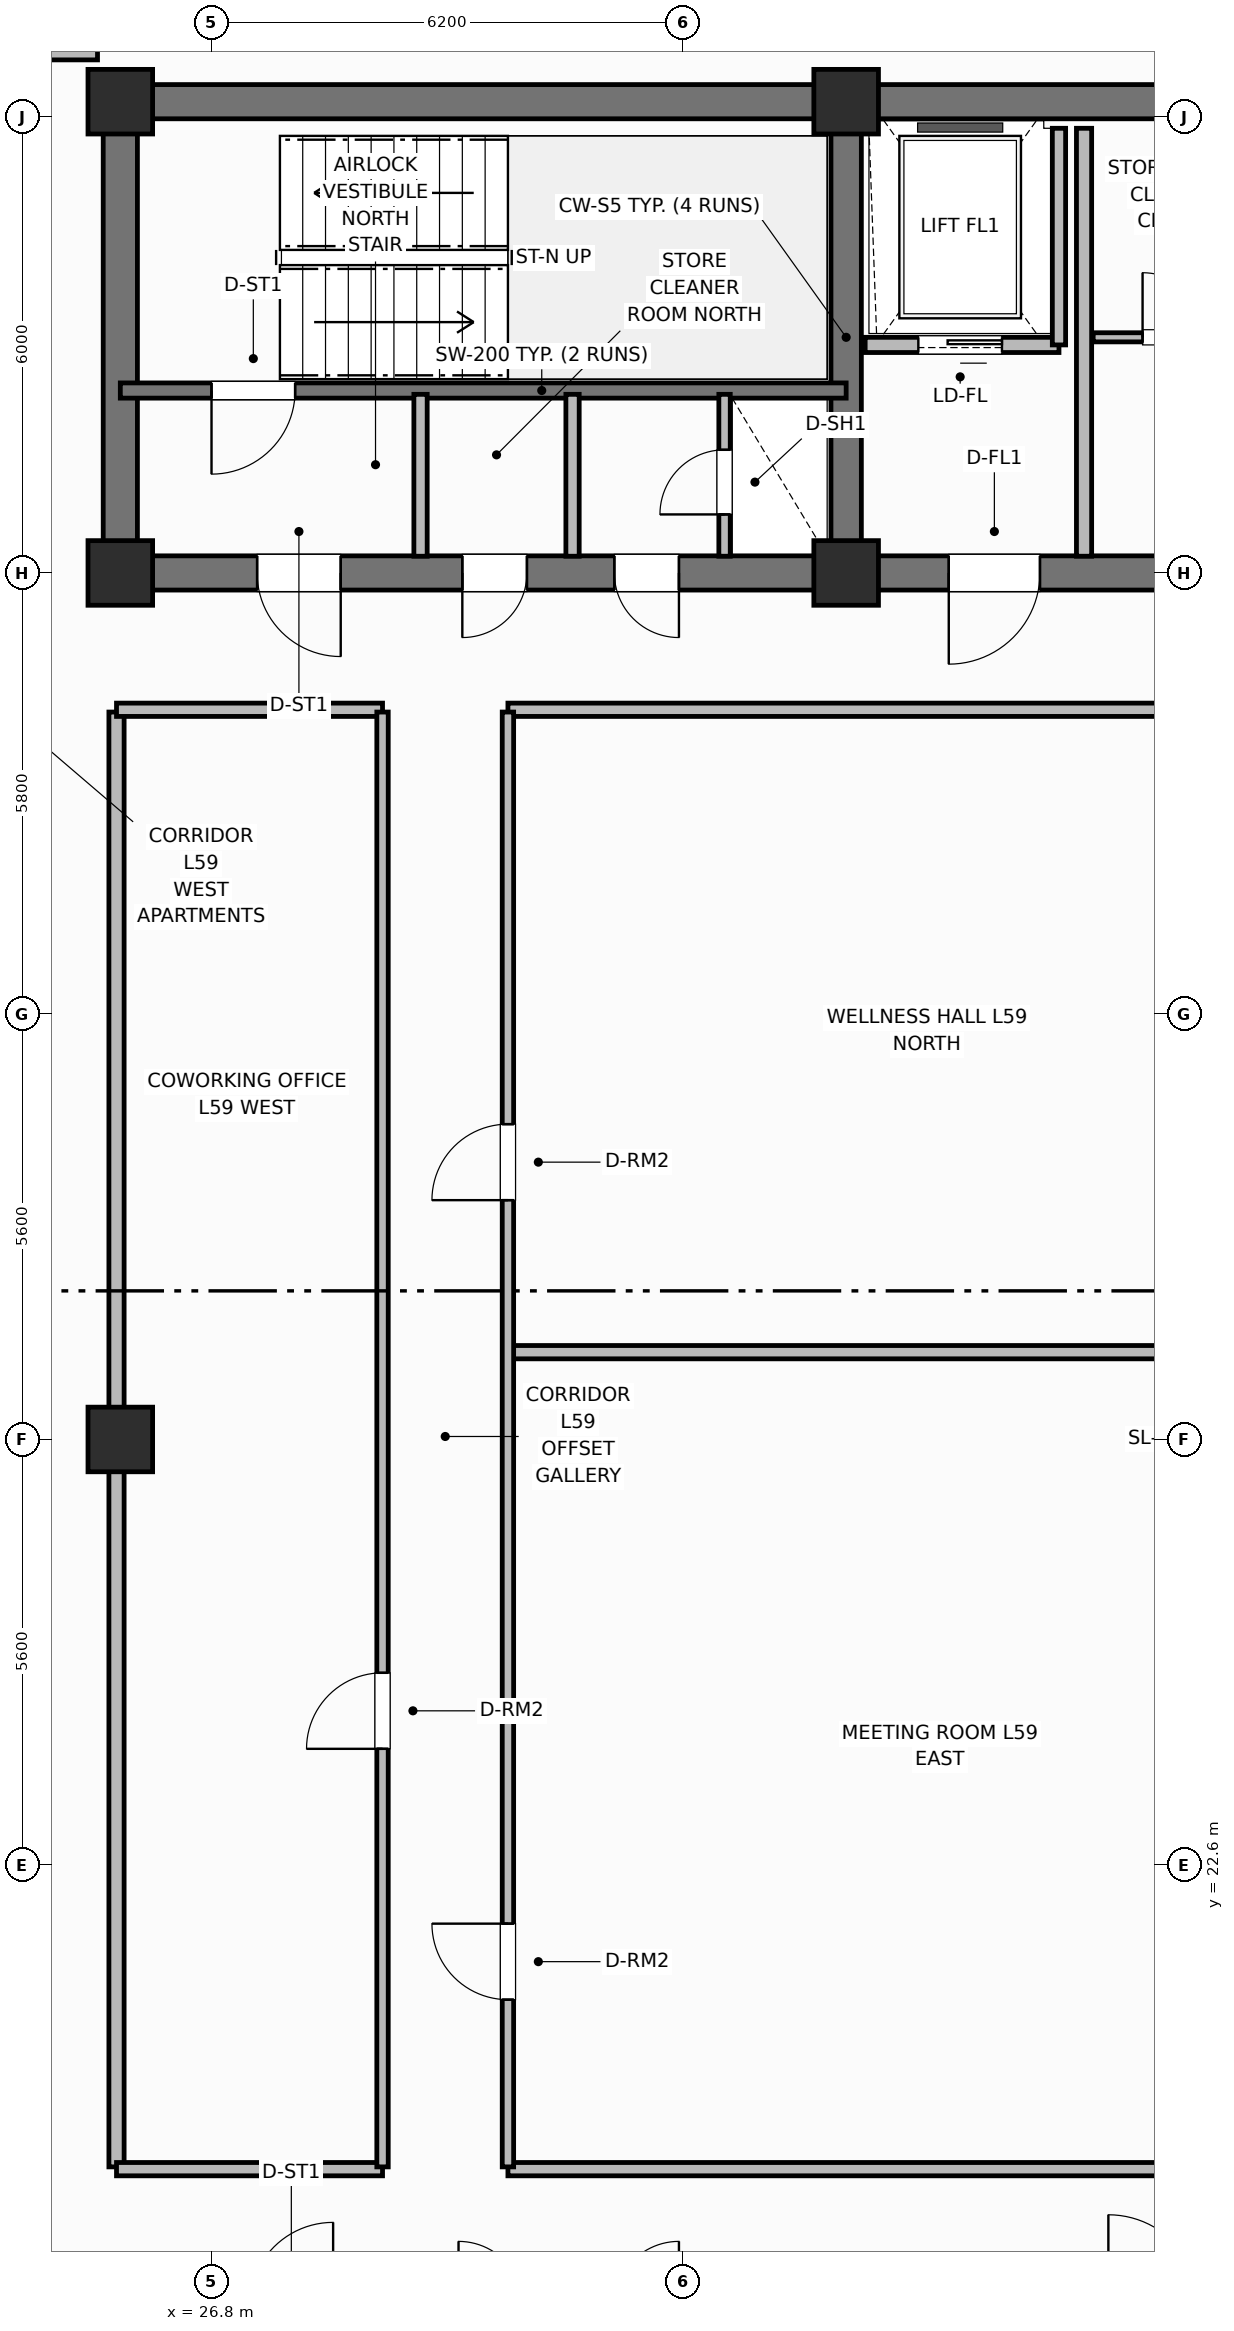
"""IFC4 building model, lengths in metres.
Left out: names, types, materials, properties, quantities, classifications, styles, units other than length and angle.
Written with IfcOpenShell. Run it as: python <this file> out.ifc"""

import sys

from ifc_helpers import new_model, si_unit, direction, frame, frame_2d, origin, origin_2d, place, context, subcontext, project, spatial, rectangle, extrude, element, fill, save


model = new_model("IFC4")
c1 = context("Model", 3, precision=1e-05, world=origin(), true_north=direction((0.0, 1.0)))
c2 = subcontext(c1, "Body", "Model", "MODEL_VIEW")
j1 = project(units=[si_unit("LENGTHUNIT", "METRE"), si_unit("PLANEANGLEUNIT", "RADIAN")], contexts=[c1])
p1 = place(None, origin())
s1 = spatial("IfcSite", under=j1, at=p1, CompositionType="ELEMENT")
p2 = place(p1, origin())
s2 = spatial("IfcBuilding", under=s1, at=p2, CompositionType="ELEMENT")
p3 = place(p2, frame((0.0, 0.0, 236.9)))
s3 = spatial("IfcBuildingStorey", under=s2, at=p3, CompositionType="ELEMENT", Elevation=236.9)
p4 = place(p3, frame((25.6, 45.8, 0.0), z_axis=(0.0, 0.0, 1.0), x_axis=(1.0, 0.0, 0.0)))
e1 = element("IfcWall", 1, at=p4, inside=s3, PredefinedType="SHEAR", context=c2, shape_type="SweptSolid", body=[
    extrude(rectangle(XDim=27.2, YDim=0.45, at=frame_2d((13.6, 0.0))), origin(), (0.0, 0.0, 1.0), 3.7),
])
p5 = place(p3, frame((25.6, 39.825, 0.0), z_axis=(0.0, 0.0, 1.0), x_axis=(0.0, 1.0, 0.0)))
e2 = element("IfcWall", 2, at=p5, inside=s3, PredefinedType="SHEAR", context=c2, shape_type="SweptSolid", body=[
    extrude(rectangle(XDim=5.75, YDim=0.45, at=frame_2d((2.875, 0.0))), origin(), (0.0, 0.0, 1.0), 3.7),
])
p6 = place(p3, frame((52.8, 39.6, 0.0), z_axis=(0.0, 0.0, 1.0), x_axis=(-1.0, 0.0, 0.0)))
e3 = element("IfcWall", 3, at=p6, inside=s3, PredefinedType="SHEAR", context=c2, shape_type="SweptSolid", body=[
    extrude(rectangle(XDim=27.2, YDim=0.45, at=frame_2d((13.6, 0.0))), origin(), (0.0, 0.0, 1.0), 3.7),
])
p7 = place(p6, frame((24.3, 0.0, 0.0)))
e4 = element("IfcOpeningElement", 4, at=p7, cuts=e3, PredefinedType="OPENING", context=c2, shape_type="SweptSolid", body=[
    extrude(rectangle(XDim=1.1, YDim=2.15, at=frame_2d((0.55, 1.075))), frame((0.0, 0.235, 0.0), z_axis=(0.0, -1.0, 0.0), x_axis=(1.0, 0.0, 0.0)), (0.0, 0.0, 1.0), 0.47),
])
p8 = place(p6, frame((21.85, 0.0, 0.0)))
e5 = element("IfcOpeningElement", 5, at=p8, cuts=e3, PredefinedType="OPENING", context=c2, shape_type="SweptSolid", body=[
    extrude(rectangle(XDim=0.85, YDim=2.1, at=frame_2d((0.425, 1.05))), frame((0.0, 0.235, 0.0), z_axis=(0.0, -1.0, 0.0), x_axis=(1.0, 0.0, 0.0)), (0.0, 0.0, 1.0), 0.47),
])
p9 = place(p6, frame((19.85, 0.0, 0.0)))
e6 = element("IfcOpeningElement", 6, at=p9, cuts=e3, PredefinedType="OPENING", context=c2, shape_type="SweptSolid", body=[
    extrude(rectangle(XDim=0.85, YDim=2.1, at=frame_2d((0.425, 1.05))), frame((0.0, 0.235, 0.0), z_axis=(0.0, -1.0, 0.0), x_axis=(1.0, 0.0, 0.0)), (0.0, 0.0, 1.0), 0.47),
])
p10 = place(p6, frame((15.1, 0.0, 0.0)))
e7 = element("IfcOpeningElement", 7, at=p10, cuts=e3, PredefinedType="OPENING", context=c2, shape_type="SweptSolid", body=[
    extrude(rectangle(XDim=1.2, YDim=2.15, at=frame_2d((0.6, 1.075))), frame((0.0, 0.235, 0.0), z_axis=(0.0, -1.0, 0.0), x_axis=(1.0, 0.0, 0.0)), (0.0, 0.0, 1.0), 0.47),
])
p11 = place(p6, frame((12.6, 0.0, 0.0)))
e8 = element("IfcOpeningElement", 8, at=p11, cuts=e3, PredefinedType="OPENING", context=c2, shape_type="SweptSolid", body=[
    extrude(rectangle(XDim=0.85, YDim=2.1, at=frame_2d((0.425, 1.05))), frame((0.0, 0.235, 0.0), z_axis=(0.0, -1.0, 0.0), x_axis=(1.0, 0.0, 0.0)), (0.0, 0.0, 1.0), 0.47),
])
p12 = place(p6, frame((10.85, 0.0, 0.0)))
e9 = element("IfcOpeningElement", 9, at=p12, cuts=e3, PredefinedType="OPENING", context=c2, shape_type="SweptSolid", body=[
    extrude(rectangle(XDim=0.85, YDim=2.1, at=frame_2d((0.425, 1.05))), frame((0.0, 0.235, 0.0), z_axis=(0.0, -1.0, 0.0), x_axis=(1.0, 0.0, 0.0)), (0.0, 0.0, 1.0), 0.47),
])
p13 = place(p6, frame((7.35, 0.0, 0.0)))
e10 = element("IfcOpeningElement", 10, at=p13, cuts=e3, PredefinedType="OPENING", context=c2, shape_type="SweptSolid", body=[
    extrude(rectangle(XDim=0.85, YDim=2.1, at=frame_2d((0.425, 1.05))), frame((0.0, 0.235, 0.0), z_axis=(0.0, -1.0, 0.0), x_axis=(1.0, 0.0, 0.0)), (0.0, 0.0, 1.0), 0.47),
])
p14 = place(p6, frame((4.2, 0.0, 0.0)))
e11 = element("IfcOpeningElement", 11, at=p14, cuts=e3, PredefinedType="OPENING", context=c2, shape_type="SweptSolid", body=[
    extrude(rectangle(XDim=1.3, YDim=2.2, at=frame_2d((0.65, 1.1))), frame((0.0, 0.235, 0.0), z_axis=(0.0, -1.0, 0.0), x_axis=(1.0, 0.0, 0.0)), (0.0, 0.0, 1.0), 0.47),
])
p15 = place(p3, frame((35.15, 39.825, 0.0), z_axis=(0.0, 0.0, 1.0), x_axis=(0.0, 1.0, 0.0)))
e12 = element("IfcWall", 12, at=p15, inside=s3, PredefinedType="SHEAR", context=c2, shape_type="SweptSolid", body=[
    extrude(rectangle(XDim=5.75, YDim=0.4, at=frame_2d((2.875, 0.0))), origin(), (0.0, 0.0, 1.0), 3.7),
])
for number, where, z_axis, x_axis in (
    (13, (25.6, 39.6, 0.0), (0.0, 0.0, 1.0), (1.0, 0.0, 0.0)),
    (14, (25.6, 45.8, 0.0), (0.0, 0.0, 1.0), (1.0, 0.0, 0.0)),
    (15, (35.15, 39.6, 0.0), (0.0, 0.0, 1.0), (1.0, 0.0, 0.0)),
    (16, (35.15, 45.8, 0.0), (0.0, 0.0, 1.0), (1.0, 0.0, 0.0)),
    (17, (25.6, 28.2, 0.0), (0.0, 0.0, 1.0), (1.0, 0.0, 0.0)),
):
    element("IfcColumn", number, at=place(p3, frame(where, z_axis=z_axis, x_axis=x_axis)), inside=s3, PredefinedType="COLUMN", context=c2, shape_type="SweptSolid", body=[
        extrude(rectangle(XDim=0.85, YDim=0.85, at=origin_2d()), origin(), (0.0, 0.0, 1.0), 3.7),
    ])
p16 = place(p3, frame((35.15, 42.0, 0.0), z_axis=(0.0, 0.0, 1.0), x_axis=(-1.0, 0.0, 0.0)))
e18 = element("IfcWall", 18, at=p16, inside=s3, PredefinedType="SHEAR", context=c2, shape_type="SweptSolid", body=[
    extrude(rectangle(XDim=9.55, YDim=0.2, at=frame_2d((4.775, 0.0))), origin(), (0.0, 0.0, 1.0), 3.7),
])
p17 = place(p16, frame((7.25, 0.0, 0.0)))
e19 = element("IfcOpeningElement", 19, at=p17, cuts=e18, PredefinedType="OPENING", context=c2, shape_type="SweptSolid", body=[
    extrude(rectangle(XDim=1.1, YDim=2.15, at=frame_2d((0.55, 1.075))), frame((0.0, 0.11, 0.0), z_axis=(0.0, -1.0, 0.0), x_axis=(1.0, 0.0, 0.0)), (0.0, 0.0, 1.0), 0.22),
])
p18 = place(p3, frame((33.55, 39.82, 0.0), z_axis=(0.0, 0.0, 1.0), x_axis=(0.0, 1.0, 0.0)))
e20 = element("IfcWall", 20, at=p18, inside=s3, PredefinedType="PARTITIONING", context=c2, shape_type="SweptSolid", body=[
    extrude(rectangle(XDim=2.13, YDim=0.15, at=frame_2d((1.065, 0.0))), origin(), (0.0, 0.0, 1.0), 2.56),
])
p19 = place(p18, frame((0.55, 0.0, 0.0)))
e21 = element("IfcOpeningElement", 21, at=p19, cuts=e20, PredefinedType="OPENING", context=c2, shape_type="SweptSolid", body=[
    extrude(rectangle(XDim=0.85, YDim=2.05, at=frame_2d((0.425, 1.025))), frame((0.0, 0.085, 0.0), z_axis=(0.0, -1.0, 0.0), x_axis=(1.0, 0.0, 0.0)), (0.0, 0.0, 1.0), 0.17),
])
for number, where, z_axis, x_axis in (
    (22, (29.55, 39.82, 0.0), (0.0, 0.0, 1.0), (0.0, 1.0, 0.0)),
    (23, (31.55, 39.82, 0.0), (0.0, 0.0, 1.0), (0.0, 1.0, 0.0)),
):
    element("IfcWall", number, at=place(p3, frame(where, z_axis=z_axis, x_axis=x_axis)), inside=s3, PredefinedType="PARTITIONING", context=c2, shape_type="SweptSolid", body=[
        extrude(rectangle(XDim=2.13, YDim=0.175, at=frame_2d((1.065, 0.0))), origin(), (0.0, 0.0, 1.0), 2.56),
    ])
p20 = place(p3, frame((37.95, 42.6, 0.0), z_axis=(0.0, 0.0, 1.0), x_axis=(-1.0, 0.0, 0.0)))
e24 = element("IfcWall", 24, at=p20, inside=s3, PredefinedType="PARTITIONING", context=c2, shape_type="SweptSolid", body=[
    extrude(rectangle(XDim=2.55, YDim=0.2, at=frame_2d((1.275, 0.0))), origin(), (0.0, 0.0, 1.0), 2.33),
])
p21 = place(p20, frame((0.75, 0.0, 0.0)))
e25 = element("IfcOpeningElement", 25, at=p21, cuts=e24, PredefinedType="OPENING", context=c2, shape_type="SweptSolid", body=[
    extrude(rectangle(XDim=1.1, YDim=2.15, at=frame_2d((0.55, 1.075))), frame((0.0, 0.11, 0.0), z_axis=(0.0, -1.0, 0.0), x_axis=(1.0, 0.0, 0.0)), (0.0, 0.0, 1.0), 0.22),
])
p22 = place(p3, frame((37.95, 42.6, 0.0), z_axis=(0.0, 0.0, 1.0), x_axis=(0.0, 1.0, 0.0)))
e26 = element("IfcWall", 26, at=p22, inside=s3, PredefinedType="PARTITIONING", context=c2, shape_type="SweptSolid", body=[
    extrude(rectangle(XDim=2.85, YDim=0.175, at=frame_2d((1.425, 0.0))), origin(), (0.0, 0.0, 1.0), 2.56),
])
p23 = place(p3, frame((38.28, 39.82, 0.0), z_axis=(0.0, 0.0, 1.0), x_axis=(0.0, 1.0, 0.0)))
e27 = element("IfcWall", 27, at=p23, inside=s3, PredefinedType="PARTITIONING", context=c2, shape_type="SweptSolid", body=[
    extrude(rectangle(XDim=5.63, YDim=0.2, at=frame_2d((2.815, 0.0))), origin(), (0.0, 0.0, 1.0), 2.56),
])
p24 = place(p3, frame((38.4, 42.7, 0.0), z_axis=(0.0, 0.0, 1.0), x_axis=(1.0, 0.0, 0.0)))
e28 = element("IfcWall", 28, at=p24, inside=s3, PredefinedType="PARTITIONING", context=c2, shape_type="SweptSolid", body=[
    extrude(rectangle(XDim=2.2, YDim=0.12, at=frame_2d((1.1, 0.0))), origin(), (0.0, 0.0, 1.0), 2.33),
])
p25 = place(p24, frame((0.65, 0.0, 0.0)))
e29 = element("IfcOpeningElement", 29, at=p25, cuts=e28, PredefinedType="OPENING", context=c2, shape_type="SweptSolid", body=[
    extrude(rectangle(XDim=0.85, YDim=2.1, at=frame_2d((0.425, 1.05))), frame((0.0, 0.07, 0.0), z_axis=(0.0, -1.0, 0.0), x_axis=(1.0, 0.0, 0.0)), (0.0, 0.0, 1.0), 0.14),
])
p26 = place(p3, frame((25.55, 18.63, 0.0), z_axis=(0.0, 0.0, 1.0), x_axis=(0.0, 1.0, 0.0)))
e30 = element("IfcWall", 30, at=p26, inside=s3, PredefinedType="PARTITIONING", context=c2, shape_type="SweptSolid", body=[
    extrude(rectangle(XDim=19.14, YDim=0.2, at=frame_2d((9.57, 0.0))), origin(), (0.0, 0.0, 1.0), 2.56),
])
p27 = place(p3, frame((25.55, 18.6, 0.0), z_axis=(0.0, 0.0, 1.0), x_axis=(1.0, 0.0, 0.0)))
e31 = element("IfcWall", 31, at=p27, inside=s3, PredefinedType="PARTITIONING", context=c2, shape_type="SweptSolid", body=[
    extrude(rectangle(XDim=3.5, YDim=0.175, at=frame_2d((1.75, 0.0))), origin(), (0.0, 0.0, 1.0), 2.56),
])
p28 = place(p3, frame((30.7, 18.6, 0.0), z_axis=(0.0, 0.0, 1.0), x_axis=(1.0, 0.0, 0.0)))
e32 = element("IfcWall", 32, at=p28, inside=s3, PredefinedType="PARTITIONING", context=c2, shape_type="SweptSolid", body=[
    extrude(rectangle(XDim=22.15, YDim=0.175, at=frame_2d((11.075, 0.0))), origin(), (0.0, 0.0, 1.0), 2.56),
])
p29 = place(p3, frame((25.55, 37.8, 0.0), z_axis=(0.0, 0.0, 1.0), x_axis=(1.0, 0.0, 0.0)))
e33 = element("IfcWall", 33, at=p29, inside=s3, PredefinedType="PARTITIONING", context=c2, shape_type="SweptSolid", body=[
    extrude(rectangle(XDim=3.5, YDim=0.175, at=frame_2d((1.75, 0.0))), origin(), (0.0, 0.0, 1.0), 2.56),
])
p30 = place(p3, frame((30.7, 37.8, 0.0), z_axis=(0.0, 0.0, 1.0), x_axis=(1.0, 0.0, 0.0)))
e34 = element("IfcWall", 34, at=p30, inside=s3, PredefinedType="PARTITIONING", context=c2, shape_type="SweptSolid", body=[
    extrude(rectangle(XDim=22.15, YDim=0.175, at=frame_2d((11.075, 0.0))), origin(), (0.0, 0.0, 1.0), 2.56),
])
p31 = place(p3, frame((30.73, 29.348, 0.0), z_axis=(0.0, 0.0, 1.0), x_axis=(1.0, 0.0, 0.0)))
e35 = element("IfcWall", 35, at=p31, inside=s3, PredefinedType="PARTITIONING", context=c2, shape_type="SweptSolid", body=[
    extrude(rectangle(XDim=22.07, YDim=0.175, at=frame_2d((11.035, 0.0))), origin(), (0.0, 0.0, 1.0), 2.56),
])
p32 = place(p3, frame((29.05, 18.63, 0.0), z_axis=(0.0, 0.0, 1.0), x_axis=(0.0, 1.0, 0.0)))
e36 = element("IfcWall", 36, at=p32, inside=s3, PredefinedType="PARTITIONING", context=c2, shape_type="SweptSolid", body=[
    extrude(rectangle(XDim=19.14, YDim=0.15, at=frame_2d((9.57, 0.0))), origin(), (0.0, 0.0, 1.0), 2.56),
])
p33 = place(p32, frame((5.5, 0.0, 0.0)))
e37 = element("IfcOpeningElement", 37, at=p33, cuts=e36, PredefinedType="OPENING", context=c2, shape_type="SweptSolid", body=[
    extrude(rectangle(XDim=1.0, YDim=2.15, at=frame_2d((0.5, 1.075))), frame((0.0, 0.085, 0.0), z_axis=(0.0, -1.0, 0.0), x_axis=(1.0, 0.0, 0.0)), (0.0, 0.0, 1.0), 0.17),
])
p34 = place(p3, frame((30.7, 18.63, 0.0), z_axis=(0.0, 0.0, 1.0), x_axis=(0.0, 1.0, 0.0)))
e38 = element("IfcWall", 38, at=p34, inside=s3, PredefinedType="PARTITIONING", context=c2, shape_type="SweptSolid", body=[
    extrude(rectangle(XDim=19.14, YDim=0.15, at=frame_2d((9.57, 0.0))), origin(), (0.0, 0.0, 1.0), 2.56),
])
p35 = place(p34, frame((2.2, 0.0, 0.0)))
e39 = element("IfcOpeningElement", 39, at=p35, cuts=e38, PredefinedType="OPENING", context=c2, shape_type="SweptSolid", body=[
    extrude(rectangle(XDim=1.0, YDim=2.15, at=frame_2d((0.5, 1.075))), frame((0.0, 0.085, 0.0), z_axis=(0.0, -1.0, 0.0), x_axis=(1.0, 0.0, 0.0)), (0.0, 0.0, 1.0), 0.17),
])
p36 = place(p34, frame((12.719, 0.0, 0.0)))
e40 = element("IfcOpeningElement", 40, at=p36, cuts=e38, PredefinedType="OPENING", context=c2, shape_type="SweptSolid", body=[
    extrude(rectangle(XDim=1.0, YDim=2.15, at=frame_2d((0.5, 1.075))), frame((0.0, 0.085, 0.0), z_axis=(0.0, -1.0, 0.0), x_axis=(1.0, 0.0, 0.0)), (0.0, 0.0, 1.0), 0.17),
])
p37 = place(p3, frame((21.546, 46.45, 0.0), z_axis=(0.0, 0.0, 1.0), x_axis=(1.0, 0.0, 0.0)))
e41 = element("IfcWall", 41, at=p37, inside=s3, PredefinedType="PARTITIONING", context=c2, shape_type="SweptSolid", body=[
    extrude(rectangle(XDim=3.754, YDim=0.2, at=frame_2d((1.877, 0.0))), origin(), (0.0, 0.0, 1.0), 2.56),
])
p38 = place(p17, origin())
e42 = element("IfcDoor", 42, at=p38, inside=s3, OperationType="SINGLE_SWING_RIGHT", PredefinedType="DOOR", context=c2, shape_type="SweptSolid", body=[
    extrude(rectangle(XDim=1.1, YDim=2.15, at=frame_2d((0.55, 1.075))), frame((0.0, 0.025, 0.0), z_axis=(0.0, -1.0, 0.0), x_axis=(1.0, 0.0, 0.0)), (0.0, 0.0, 1.0), 0.05),
])
fill(e19, e42)
p39 = place(p19, origin())
e43 = element("IfcDoor", 43, at=p39, inside=s3, OperationType="SINGLE_SWING_LEFT", PredefinedType="TRAPDOOR", context=c2, shape_type="SweptSolid", body=[
    extrude(rectangle(XDim=0.85, YDim=2.05, at=frame_2d((0.425, 1.025))), frame((0.0, 0.025, 0.0), z_axis=(0.0, -1.0, 0.0), x_axis=(1.0, 0.0, 0.0)), (0.0, 0.0, 1.0), 0.05),
])
fill(e21, e43)
p40 = place(p21, origin())
e44 = element("IfcDoor", 44, at=p40, inside=s3, OperationType="SLIDING_TO_LEFT", PredefinedType="DOOR", context=c2, shape_type="SweptSolid", body=[
    extrude(rectangle(XDim=1.1, YDim=2.15, at=frame_2d((0.55, 1.075))), frame((0.0, 0.025, 0.0), z_axis=(0.0, -1.0, 0.0), x_axis=(1.0, 0.0, 0.0)), (0.0, 0.0, 1.0), 0.05),
])
fill(e25, e44)
p41 = place(p25, origin())
e45 = element("IfcDoor", 45, at=p41, inside=s3, OperationType="SINGLE_SWING_LEFT", PredefinedType="DOOR", context=c2, shape_type="SweptSolid", body=[
    extrude(rectangle(XDim=0.85, YDim=2.1, at=frame_2d((0.425, 1.05))), frame((0.0, 0.025, 0.0), z_axis=(0.0, -1.0, 0.0), x_axis=(1.0, 0.0, 0.0)), (0.0, 0.0, 1.0), 0.05),
])
fill(e29, e45)
p42 = place(p33, origin())
e46 = element("IfcDoor", 46, at=p42, inside=s3, OperationType="SINGLE_SWING_LEFT", PredefinedType="DOOR", context=c2, shape_type="SweptSolid", body=[
    extrude(rectangle(XDim=1.0, YDim=2.15, at=frame_2d((0.5, 1.075))), frame((0.0, 0.025, 0.0), z_axis=(0.0, -1.0, 0.0), x_axis=(1.0, 0.0, 0.0)), (0.0, 0.0, 1.0), 0.05),
])
fill(e37, e46)
p43 = place(p35, origin())
e47 = element("IfcDoor", 47, at=p43, inside=s3, OperationType="SINGLE_SWING_RIGHT", PredefinedType="DOOR", context=c2, shape_type="SweptSolid", body=[
    extrude(rectangle(XDim=1.0, YDim=2.15, at=frame_2d((0.5, 1.075))), frame((0.0, 0.025, 0.0), z_axis=(0.0, -1.0, 0.0), x_axis=(1.0, 0.0, 0.0)), (0.0, 0.0, 1.0), 0.05),
])
fill(e39, e47)
p44 = place(p36, origin())
e48 = element("IfcDoor", 48, at=p44, inside=s3, OperationType="SINGLE_SWING_LEFT", PredefinedType="DOOR", context=c2, shape_type="SweptSolid", body=[
    extrude(rectangle(XDim=1.0, YDim=2.15, at=frame_2d((0.5, 1.075))), frame((0.0, 0.025, 0.0), z_axis=(0.0, -1.0, 0.0), x_axis=(1.0, 0.0, 0.0)), (0.0, 0.0, 1.0), 0.05),
])
fill(e40, e48)
p45 = place(p7, origin())
e49 = element("IfcDoor", 49, at=p45, inside=s3, OperationType="SINGLE_SWING_LEFT", PredefinedType="DOOR", context=c2, shape_type="SweptSolid", body=[
    extrude(rectangle(XDim=1.1, YDim=2.15, at=frame_2d((0.55, 1.075))), frame((0.0, 0.025, 0.0), z_axis=(0.0, -1.0, 0.0), x_axis=(1.0, 0.0, 0.0)), (0.0, 0.0, 1.0), 0.05),
])
fill(e4, e49)
p46 = place(p8, origin())
e50 = element("IfcDoor", 50, at=p46, inside=s3, OperationType="SINGLE_SWING_RIGHT", PredefinedType="DOOR", context=c2, shape_type="SweptSolid", body=[
    extrude(rectangle(XDim=0.85, YDim=2.1, at=frame_2d((0.425, 1.05))), frame((0.0, 0.025, 0.0), z_axis=(0.0, -1.0, 0.0), x_axis=(1.0, 0.0, 0.0)), (0.0, 0.0, 1.0), 0.05),
])
fill(e5, e50)
p47 = place(p9, origin())
e51 = element("IfcDoor", 51, at=p47, inside=s3, OperationType="SINGLE_SWING_LEFT", PredefinedType="DOOR", context=c2, shape_type="SweptSolid", body=[
    extrude(rectangle(XDim=0.85, YDim=2.1, at=frame_2d((0.425, 1.05))), frame((0.0, 0.025, 0.0), z_axis=(0.0, -1.0, 0.0), x_axis=(1.0, 0.0, 0.0)), (0.0, 0.0, 1.0), 0.05),
])
fill(e6, e51)
p48 = place(p10, origin())
e52 = element("IfcDoor", 52, at=p48, inside=s3, OperationType="SINGLE_SWING_RIGHT", PredefinedType="DOOR", context=c2, shape_type="SweptSolid", body=[
    extrude(rectangle(XDim=1.2, YDim=2.15, at=frame_2d((0.6, 1.075))), frame((0.0, 0.025, 0.0), z_axis=(0.0, -1.0, 0.0), x_axis=(1.0, 0.0, 0.0)), (0.0, 0.0, 1.0), 0.05),
])
fill(e7, e52)
save(model, sys.argv[1])
